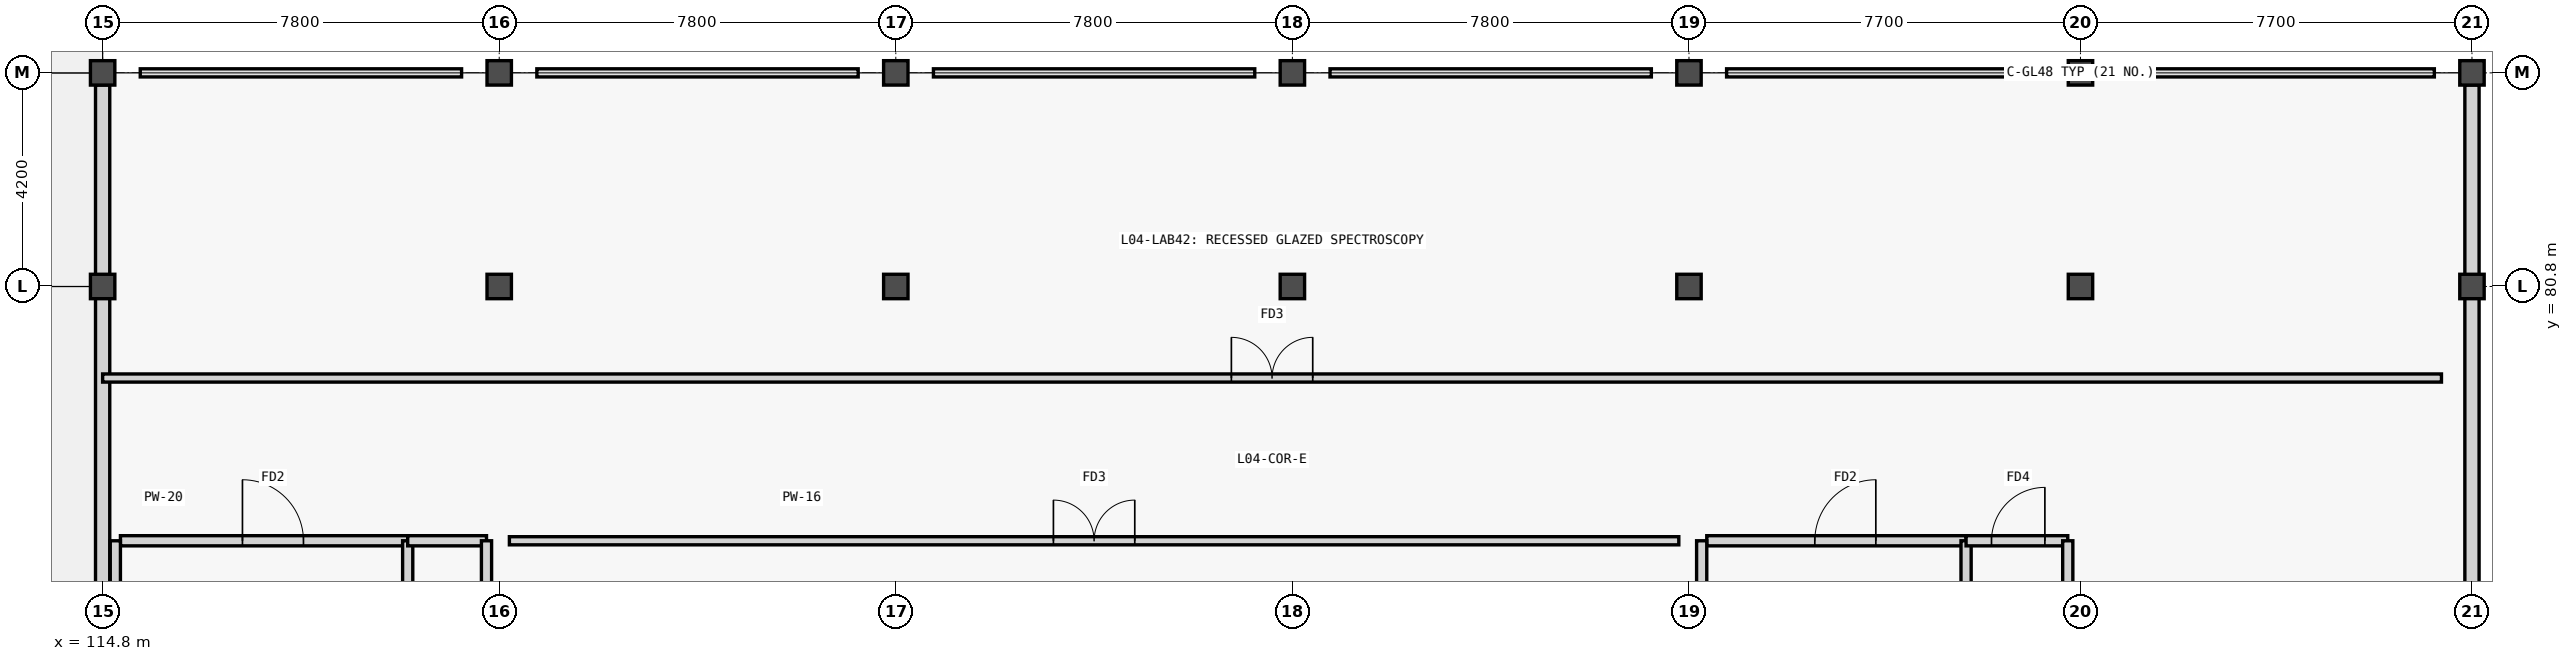
"""IFC4 building model, lengths in metres.
Left out: names, types, materials, properties, quantities, classifications, styles, units other than length and angle.
Written with IfcOpenShell. Run it as: python <this file> out.ifc"""

import sys

from ifc_helpers import new_model, si_unit, direction, frame, frame_2d, origin, origin_2d, place, context, subcontext, project, spatial, rectangle, extrude, element, fill, save


model = new_model("IFC4")
c1 = context("Model", 3, precision=1e-05, world=origin(), true_north=direction((0.0, 1.0)))
c2 = subcontext(c1, "Body", "Model", "MODEL_VIEW")
j1 = project(units=[si_unit("LENGTHUNIT", "METRE"), si_unit("PLANEANGLEUNIT", "RADIAN")], contexts=[c1])
p1 = place(None, origin())
s1 = spatial("IfcSite", under=j1, at=p1, CompositionType="ELEMENT")
p2 = place(p1, origin())
s2 = spatial("IfcBuilding", under=s1, at=p2, CompositionType="ELEMENT")
p3 = place(p2, frame((0.0, 0.0, 18.0)))
s3 = spatial("IfcBuildingStorey", under=s2, at=p3, CompositionType="ELEMENT", Elevation=18.0)
for number, where, z_axis, x_axis in (
    (1, (114.8, 80.8, 0.0), (0.0, 0.0, 1.0), (1.0, 0.0, 0.0)),
    (2, (114.8, 85.0, 0.0), (0.0, 0.0, 1.0), (1.0, 0.0, 0.0)),
    (3, (122.6, 80.8, 0.0), (0.0, 0.0, 1.0), (1.0, 0.0, 0.0)),
    (4, (122.6, 85.0, 0.0), (0.0, 0.0, 1.0), (1.0, 0.0, 0.0)),
    (5, (130.4, 80.8, 0.0), (0.0, 0.0, 1.0), (1.0, 0.0, 0.0)),
    (6, (130.4, 85.0, 0.0), (0.0, 0.0, 1.0), (1.0, 0.0, 0.0)),
    (7, (138.2, 80.8, 0.0), (0.0, 0.0, 1.0), (1.0, 0.0, 0.0)),
    (8, (138.2, 85.0, 0.0), (0.0, 0.0, 1.0), (1.0, 0.0, 0.0)),
    (9, (146.0, 80.8, 0.0), (0.0, 0.0, 1.0), (1.0, 0.0, 0.0)),
    (10, (146.0, 85.0, 0.0), (0.0, 0.0, 1.0), (1.0, 0.0, 0.0)),
    (11, (153.7, 80.8, 0.0), (0.0, 0.0, 1.0), (1.0, 0.0, 0.0)),
    (12, (153.7, 85.0, 0.0), (0.0, 0.0, 1.0), (1.0, 0.0, 0.0)),
    (13, (161.4, 80.8, 0.0), (0.0, 0.0, 1.0), (1.0, 0.0, 0.0)),
    (14, (161.4, 85.0, 0.0), (0.0, 0.0, 1.0), (1.0, 0.0, 0.0)),
):
    element("IfcColumn", number, at=place(p3, frame(where, z_axis=z_axis, x_axis=x_axis)), inside=s3, PredefinedType="COLUMN", context=c2, shape_type="SweptSolid", body=[
        extrude(rectangle(XDim=0.48, YDim=0.48, at=origin_2d()), origin(), (0.0, 0.0, 1.0), 3.6),
    ])
p4 = place(p3, frame((161.4, 84.762, 0.0), z_axis=(0.0, 0.0, 1.0), x_axis=(0.0, -1.0, 0.0)))
e15 = element("IfcWall", 15, at=p4, inside=s3, PredefinedType="SOLIDWALL", context=c2, shape_type="SweptSolid", body=[
    extrude(rectangle(XDim=20.524, YDim=0.28, at=frame_2d((10.262, 0.0))), origin(), (0.0, 0.0, 1.0), 1.96),
])
p5 = place(p3, frame((114.8, 72.6, 0.0), z_axis=(0.0, 0.0, 1.0), x_axis=(0.0, 1.0, 0.0)))
e16 = element("IfcWall", 16, at=p5, inside=s3, PredefinedType="SOLIDWALL", context=c2, shape_type="SweptSolid", body=[
    extrude(rectangle(XDim=12.162, YDim=0.28, at=frame_2d((6.081, 0.0))), origin(), (0.0, 0.0, 1.0), 0.9),
])
p6 = place(p3, frame((115.15, 75.8, 0.0), z_axis=(0.0, 0.0, 1.0), x_axis=(1.0, 0.0, 0.0)))
e17 = element("IfcWall", 17, at=p6, inside=s3, PredefinedType="PARTITIONING", context=c2, shape_type="SweptSolid", body=[
    extrude(rectangle(XDim=5.65, YDim=0.2, at=frame_2d((2.825, 0.0))), origin(), (0.0, 0.0, 1.0), 3.32),
])
p7 = place(p6, frame((2.4, 0.0, 0.0)))
e18 = element("IfcOpeningElement", 18, at=p7, cuts=e17, PredefinedType="OPENING", context=c2, shape_type="SweptSolid", body=[
    extrude(rectangle(XDim=1.2, YDim=2.2, at=frame_2d((0.6, 1.1))), frame((0.0, 0.11, 0.0), z_axis=(0.0, -1.0, 0.0), x_axis=(1.0, 0.0, 0.0)), (0.0, 0.0, 1.0), 0.22),
])
p8 = place(p3, frame((115.05, 72.4, 0.0), z_axis=(0.0, 0.0, 1.0), x_axis=(0.0, 1.0, 0.0)))
e19 = element("IfcWall", 19, at=p8, inside=s3, PredefinedType="PARTITIONING", context=c2, shape_type="SweptSolid", body=[
    extrude(rectangle(XDim=3.4, YDim=0.2, at=frame_2d((1.7, 0.0))), origin(), (0.0, 0.0, 1.0), 3.32),
])
p9 = place(p3, frame((120.8, 72.4, 0.0), z_axis=(0.0, 0.0, 1.0), x_axis=(0.0, 1.0, 0.0)))
e20 = element("IfcWall", 20, at=p9, inside=s3, PredefinedType="PARTITIONING", context=c2, shape_type="SweptSolid", body=[
    extrude(rectangle(XDim=3.4, YDim=0.2, at=frame_2d((1.7, 0.0))), origin(), (0.0, 0.0, 1.0), 3.32),
])
p10 = place(p9, frame((1.1, 0.0, 0.0)))
e21 = element("IfcOpeningElement", 21, at=p10, cuts=e20, PredefinedType="OPENING", context=c2, shape_type="SweptSolid", body=[
    extrude(rectangle(XDim=1.2, YDim=2.2, at=frame_2d((0.6, 1.1))), frame((0.0, 0.11, 0.0), z_axis=(0.0, -1.0, 0.0), x_axis=(1.0, 0.0, 0.0)), (0.0, 0.0, 1.0), 0.22),
])
p11 = place(p3, frame((120.8, 75.8, 0.0), z_axis=(0.0, 0.0, 1.0), x_axis=(1.0, 0.0, 0.0)))
e22 = element("IfcWall", 22, at=p11, inside=s3, PredefinedType="PARTITIONING", context=c2, shape_type="SweptSolid", body=[
    extrude(rectangle(XDim=1.55, YDim=0.2, at=frame_2d((0.775, 0.0))), origin(), (0.0, 0.0, 1.0), 3.32),
])
p12 = place(p3, frame((122.35, 72.4, 0.0), z_axis=(0.0, 0.0, 1.0), x_axis=(0.0, 1.0, 0.0)))
e23 = element("IfcWall", 23, at=p12, inside=s3, PredefinedType="PARTITIONING", context=c2, shape_type="SweptSolid", body=[
    extrude(rectangle(XDim=3.4, YDim=0.2, at=frame_2d((1.7, 0.0))), origin(), (0.0, 0.0, 1.0), 2.76),
])
p13 = place(p3, frame((146.35, 75.8, 0.0), z_axis=(0.0, 0.0, 1.0), x_axis=(1.0, 0.0, 0.0)))
e24 = element("IfcWall", 24, at=p13, inside=s3, PredefinedType="PARTITIONING", context=c2, shape_type="SweptSolid", body=[
    extrude(rectangle(XDim=5.1, YDim=0.2, at=frame_2d((2.55, 0.0))), origin(), (0.0, 0.0, 1.0), 3.32),
])
p14 = place(p13, frame((2.125, 0.0, 0.0)))
e25 = element("IfcOpeningElement", 25, at=p14, cuts=e24, PredefinedType="OPENING", context=c2, shape_type="SweptSolid", body=[
    extrude(rectangle(XDim=1.2, YDim=2.2, at=frame_2d((0.6, 1.1))), frame((0.0, 0.11, 0.0), z_axis=(0.0, -1.0, 0.0), x_axis=(1.0, 0.0, 0.0)), (0.0, 0.0, 1.0), 0.22),
])
p15 = place(p3, frame((146.25, 72.4, 0.0), z_axis=(0.0, 0.0, 1.0), x_axis=(0.0, 1.0, 0.0)))
e26 = element("IfcWall", 26, at=p15, inside=s3, PredefinedType="PARTITIONING", context=c2, shape_type="SweptSolid", body=[
    extrude(rectangle(XDim=3.4, YDim=0.2, at=frame_2d((1.7, 0.0))), origin(), (0.0, 0.0, 1.0), 2.76),
])
p16 = place(p3, frame((151.45, 72.4, 0.0), z_axis=(0.0, 0.0, 1.0), x_axis=(0.0, 1.0, 0.0)))
e27 = element("IfcWall", 27, at=p16, inside=s3, PredefinedType="PARTITIONING", context=c2, shape_type="SweptSolid", body=[
    extrude(rectangle(XDim=3.4, YDim=0.2, at=frame_2d((1.7, 0.0))), origin(), (0.0, 0.0, 1.0), 3.32),
])
p17 = place(p16, frame((1.1, 0.0, 0.0)))
e28 = element("IfcOpeningElement", 28, at=p17, cuts=e27, PredefinedType="OPENING", context=c2, shape_type="SweptSolid", body=[
    extrude(rectangle(XDim=1.2, YDim=2.2, at=frame_2d((0.6, 1.1))), frame((0.0, 0.11, 0.0), z_axis=(0.0, -1.0, 0.0), x_axis=(1.0, 0.0, 0.0)), (0.0, 0.0, 1.0), 0.22),
])
p18 = place(p3, frame((151.45, 75.8, 0.0), z_axis=(0.0, 0.0, 1.0), x_axis=(1.0, 0.0, 0.0)))
e29 = element("IfcWall", 29, at=p18, inside=s3, PredefinedType="PARTITIONING", context=c2, shape_type="SweptSolid", body=[
    extrude(rectangle(XDim=2.0, YDim=0.2, at=frame_2d((1.0, 0.0))), origin(), (0.0, 0.0, 1.0), 3.32),
])
p19 = place(p18, frame((0.5, 0.0, 0.0)))
e30 = element("IfcOpeningElement", 30, at=p19, cuts=e29, PredefinedType="OPENING", context=c2, shape_type="SweptSolid", body=[
    extrude(rectangle(XDim=1.05, YDim=2.15, at=frame_2d((0.525, 1.075))), frame((0.0, 0.11, 0.0), z_axis=(0.0, -1.0, 0.0), x_axis=(1.0, 0.0, 0.0)), (0.0, 0.0, 1.0), 0.22),
])
p20 = place(p3, frame((153.45, 72.4, 0.0), z_axis=(0.0, 0.0, 1.0), x_axis=(0.0, 1.0, 0.0)))
e31 = element("IfcWall", 31, at=p20, inside=s3, PredefinedType="PARTITIONING", context=c2, shape_type="SweptSolid", body=[
    extrude(rectangle(XDim=3.4, YDim=0.2, at=frame_2d((1.7, 0.0))), origin(), (0.0, 0.0, 1.0), 2.76),
])
p21 = place(p3, frame((122.8, 75.8, 0.0), z_axis=(0.0, 0.0, 1.0), x_axis=(1.0, 0.0, 0.0)))
e32 = element("IfcWall", 32, at=p21, inside=s3, PredefinedType="PARTITIONING", context=c2, shape_type="SweptSolid", body=[
    extrude(rectangle(XDim=23.0, YDim=0.16, at=frame_2d((11.5, 0.0))), origin(), (0.0, 0.0, 1.0), 3.34),
])
p22 = place(p21, frame((10.7, 0.0, 0.0)))
e33 = element("IfcOpeningElement", 33, at=p22, cuts=e32, PredefinedType="OPENING", context=c2, shape_type="SweptSolid", body=[
    extrude(rectangle(XDim=1.6, YDim=2.2, at=frame_2d((0.8, 1.1))), frame((0.0, 0.09, 0.0), z_axis=(0.0, -1.0, 0.0), x_axis=(1.0, 0.0, 0.0)), (0.0, 0.0, 1.0), 0.18),
])
p23 = place(p3, frame((114.8, 79.0, 0.0), z_axis=(0.0, 0.0, 1.0), x_axis=(1.0, 0.0, 0.0)))
e34 = element("IfcWall", 34, at=p23, inside=s3, PredefinedType="PARTITIONING", context=c2, shape_type="SweptSolid", body=[
    extrude(rectangle(XDim=46.0, YDim=0.16, at=frame_2d((23.0, 0.0))), origin(), (0.0, 0.0, 1.0), 3.34),
])
p24 = place(p23, frame((22.2, 0.0, 0.0)))
e35 = element("IfcOpeningElement", 35, at=p24, cuts=e34, PredefinedType="OPENING", context=c2, shape_type="SweptSolid", body=[
    extrude(rectangle(XDim=1.6, YDim=2.2, at=frame_2d((0.8, 1.1))), frame((0.0, 0.09, 0.0), z_axis=(0.0, -1.0, 0.0), x_axis=(1.0, 0.0, 0.0)), (0.0, 0.0, 1.0), 0.18),
])
p25 = place(p7, origin())
e36 = element("IfcDoor", 36, at=p25, inside=s3, OperationType="SINGLE_SWING_LEFT", PredefinedType="DOOR", context=c2, shape_type="SweptSolid", body=[
    extrude(rectangle(XDim=1.2, YDim=2.2, at=frame_2d((0.6, 1.1))), frame((0.0, 0.025, 0.0), z_axis=(0.0, -1.0, 0.0), x_axis=(1.0, 0.0, 0.0)), (0.0, 0.0, 1.0), 0.05),
])
fill(e18, e36)
p26 = place(p14, origin())
e37 = element("IfcDoor", 37, at=p26, inside=s3, OperationType="SINGLE_SWING_RIGHT", PredefinedType="DOOR", context=c2, shape_type="SweptSolid", body=[
    extrude(rectangle(XDim=1.2, YDim=2.2, at=frame_2d((0.6, 1.1))), frame((0.0, 0.025, 0.0), z_axis=(0.0, -1.0, 0.0), x_axis=(1.0, 0.0, 0.0)), (0.0, 0.0, 1.0), 0.05),
])
fill(e25, e37)
p27 = place(p19, origin())
e38 = element("IfcDoor", 38, at=p27, inside=s3, OperationType="SINGLE_SWING_RIGHT", PredefinedType="DOOR", context=c2, shape_type="SweptSolid", body=[
    extrude(rectangle(XDim=1.05, YDim=2.15, at=frame_2d((0.525, 1.075))), frame((0.0, 0.025, 0.0), z_axis=(0.0, -1.0, 0.0), x_axis=(1.0, 0.0, 0.0)), (0.0, 0.0, 1.0), 0.05),
])
fill(e30, e38)
p28 = place(p22, origin())
e39 = element("IfcDoor", 39, at=p28, inside=s3, OperationType="DOUBLE_DOOR_SINGLE_SWING", PredefinedType="DOOR", context=c2, shape_type="SweptSolid", body=[
    extrude(rectangle(XDim=1.6, YDim=2.2, at=frame_2d((0.8, 1.1))), frame((0.0, 0.025, 0.0), z_axis=(0.0, -1.0, 0.0), x_axis=(1.0, 0.0, 0.0)), (0.0, 0.0, 1.0), 0.05),
])
fill(e33, e39)
p29 = place(p24, origin())
e40 = element("IfcDoor", 40, at=p29, inside=s3, OperationType="DOUBLE_DOOR_SINGLE_SWING", PredefinedType="DOOR", context=c2, shape_type="SweptSolid", body=[
    extrude(rectangle(XDim=1.6, YDim=2.2, at=frame_2d((0.8, 1.1))), frame((0.0, 0.025, 0.0), z_axis=(0.0, -1.0, 0.0), x_axis=(1.0, 0.0, 0.0)), (0.0, 0.0, 1.0), 0.05),
])
fill(e35, e40)
save(model, sys.argv[1])
